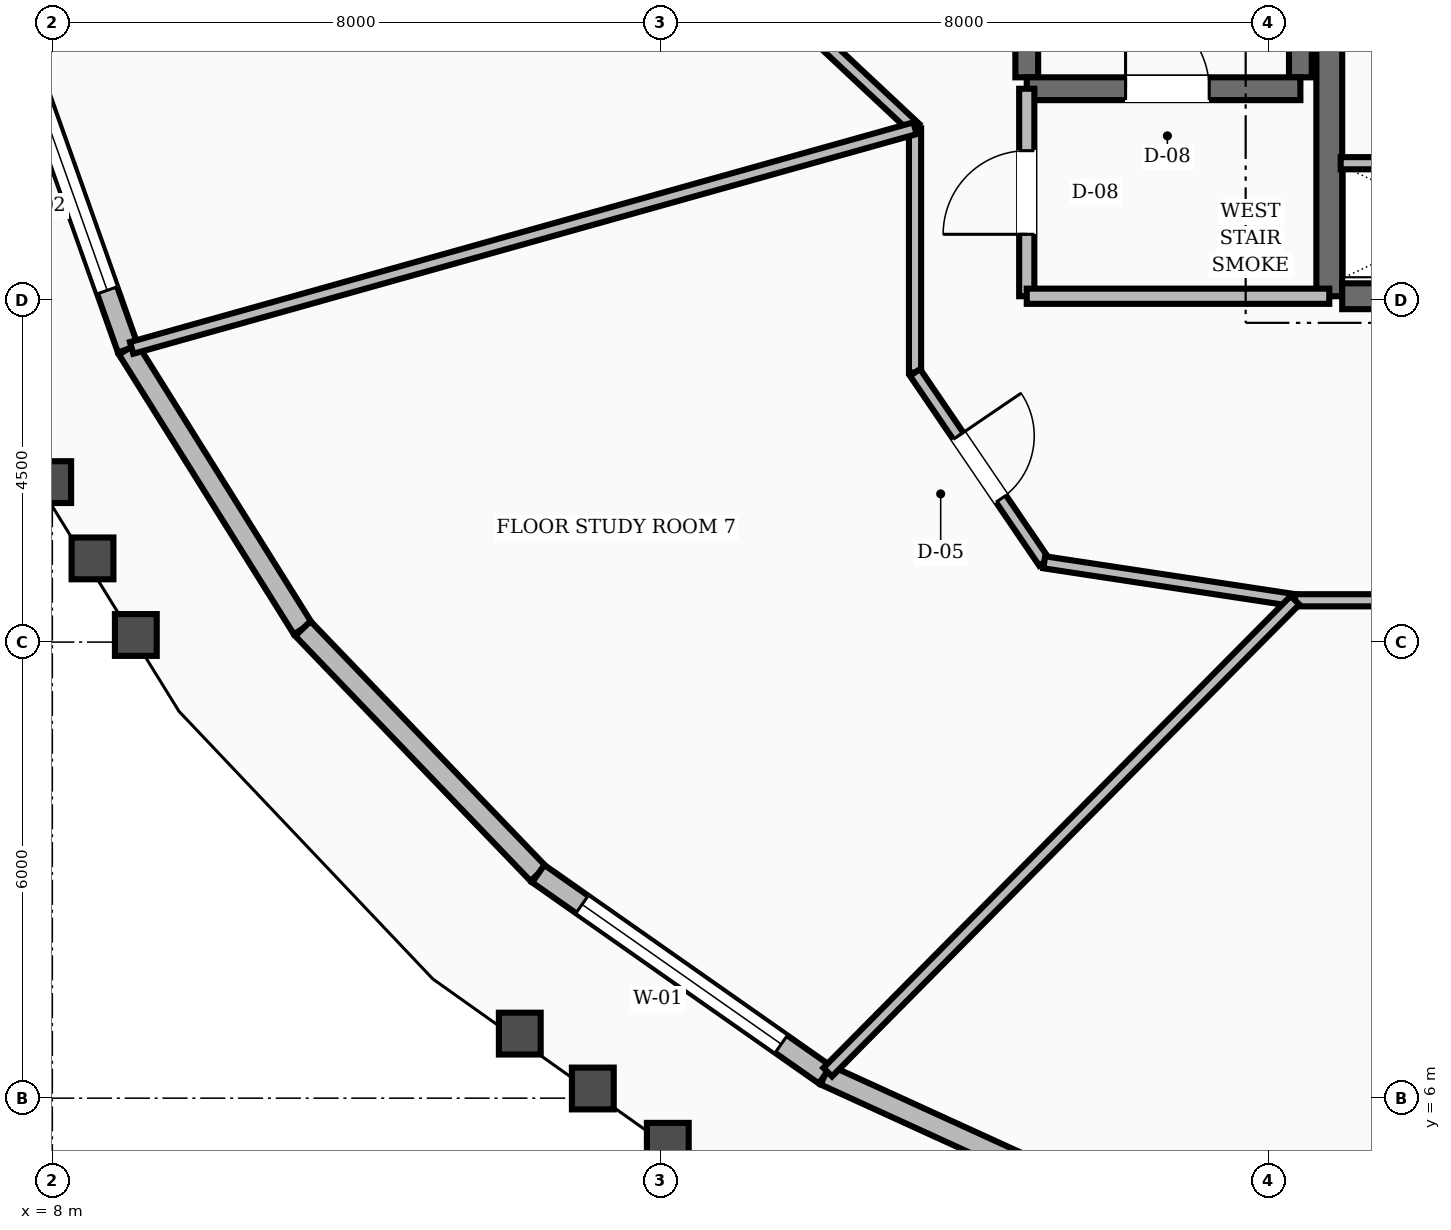
"""IFC4 building model, lengths in metres.
Left out: names, types, materials, properties, quantities, classifications, styles, units other than length and angle.
Written with IfcOpenShell. Run it as: python <this file> out.ifc"""

import sys

from ifc_helpers import new_model, si_unit, direction, frame, frame_2d, origin, place, context, subcontext, project, spatial, rectangle, extrude, element, fill, save


model = new_model("IFC4")
c1 = context("Model", 3, precision=1e-05, world=origin(), true_north=direction((0.0, 1.0)))
c2 = subcontext(c1, "Body", "Model", "MODEL_VIEW")
j1 = project(units=[si_unit("LENGTHUNIT", "METRE"), si_unit("PLANEANGLEUNIT", "RADIAN")], contexts=[c1])
p1 = place(None, origin())
s1 = spatial("IfcSite", under=j1, at=p1, CompositionType="ELEMENT")
p2 = place(p1, origin())
s2 = spatial("IfcBuilding", under=s1, at=p2, CompositionType="ELEMENT")
p3 = place(p2, frame((0.0, 0.0, 192.8)))
s3 = spatial("IfcBuildingStorey", under=s2, at=p3, CompositionType="ELEMENT", Elevation=192.8)
p4 = place(p3, frame((24.8, 16.55, 0.0), z_axis=(0.0, 0.0, 1.0), x_axis=(0.0, 1.0, 0.0)))
e1 = element("IfcWall", 1, at=p4, inside=s3, PredefinedType="SHEAR", context=c2, shape_type="SweptSolid", body=[
    extrude(rectangle(XDim=6.3, YDim=0.34, at=frame_2d((3.15, 0.0))), origin(), (0.0, 0.0, 1.0), 3.6),
])
p5 = place(p3, frame((24.97, 16.55, 0.0), z_axis=(0.0, 0.0, 1.0), x_axis=(1.0, 0.0, 0.0)))
e2 = element("IfcWall", 2, at=p5, inside=s3, PredefinedType="SHEAR", context=c2, shape_type="SweptSolid", body=[
    extrude(rectangle(XDim=3.23, YDim=0.34, at=frame_2d((1.615, 0.0))), origin(), (0.0, 0.0, 1.0), 3.6),
])
for number, where, z_axis, x_axis in (
    (3, (20.82, 19.43, 0.0), (0.0, 0.0, 1.0), (0.0, 1.0, 0.0)),
    (4, (24.42, 19.43, 0.0), (0.0, 0.0, 1.0), (0.0, 1.0, 0.0)),
):
    element("IfcWall", number, at=place(p3, frame(where, z_axis=z_axis, x_axis=x_axis)), inside=s3, PredefinedType="SHEAR", context=c2, shape_type="SweptSolid", body=[
        extrude(rectangle(XDim=8.74, YDim=0.3, at=frame_2d((4.37, 0.0))), origin(), (0.0, 0.0, 1.0), 3.6),
    ])
p6 = place(p3, frame((20.82, 19.28, 0.0), z_axis=(0.0, 0.0, 1.0), x_axis=(1.0, 0.0, 0.0)))
e5 = element("IfcWall", 5, at=p6, inside=s3, PredefinedType="SHEAR", context=c2, shape_type="SweptSolid", body=[
    extrude(rectangle(XDim=3.6, YDim=0.3, at=frame_2d((1.8, 0.0))), origin(), (0.0, 0.0, 1.0), 3.6),
])
p7 = place(p6, frame((1.3, 0.0, 0.0)))
e6 = element("IfcOpeningElement", 6, at=p7, cuts=e5, PredefinedType="OPENING", context=c2, shape_type="SweptSolid", body=[
    extrude(rectangle(XDim=1.1, YDim=2.1, at=frame_2d((0.55, 1.05))), frame((0.0, 0.16, 0.0), z_axis=(0.0, -1.0, 0.0), x_axis=(1.0, 0.0, 0.0)), (0.0, 0.0, 1.0), 0.32),
])
p8 = place(p3, frame((7.578, 19.849, 0.0), z_axis=(0.0, 0.0, 1.0), x_axis=(0.33451387388, -0.942390825604, 0.0)))
e7 = element("IfcWall", 7, at=p8, inside=s3, PredefinedType="STANDARD", context=c2, shape_type="SweptSolid", body=[
    extrude(rectangle(XDim=4.236, YDim=0.28, at=frame_2d((2.118, 0.0))), origin(), (0.0, 0.0, 1.0), 2.82),
])
p9 = place(p8, frame((0.818, 0.0, 0.8)))
e8 = element("IfcOpeningElement", 8, at=p9, cuts=e7, PredefinedType="OPENING", context=c2, shape_type="SweptSolid", body=[
    extrude(rectangle(XDim=2.6, YDim=1.65, at=frame_2d((1.3, 0.825))), frame((0.0, 0.15, 0.0), z_axis=(0.0, -1.0, 0.0), x_axis=(1.0, 0.0, 0.0)), (0.0, 0.0, 1.0), 0.3),
])
p10 = place(p3, frame((8.995, 15.857, 0.0), z_axis=(0.0, 0.0, 1.0), x_axis=(0.530277064752, -0.847824412599, 0.0)))
e9 = element("IfcWall", 9, at=p10, inside=s3, PredefinedType="STANDARD", context=c2, shape_type="SweptSolid", body=[
    extrude(rectangle(XDim=4.339, YDim=0.28, at=frame_2d((2.17, 0.0))), origin(), (0.0, 0.0, 1.0), 2.82),
])
p11 = place(p3, frame((11.296, 12.178, 0.0), z_axis=(0.0, 0.0, 1.0), x_axis=(0.692654585046, -0.721269454375, 0.0)))
e10 = element("IfcWall", 10, at=p11, inside=s3, PredefinedType="STANDARD", context=c2, shape_type="SweptSolid", body=[
    extrude(rectangle(XDim=4.471, YDim=0.28, at=frame_2d((2.235, 0.0))), origin(), (0.0, 0.0, 1.0), 2.82),
])
p12 = place(p3, frame((14.393, 8.953, 0.0), z_axis=(0.0, 0.0, 1.0), x_axis=(0.818721405334, -0.574190961657, 0.0)))
e11 = element("IfcWall", 11, at=p12, inside=s3, PredefinedType="STANDARD", context=c2, shape_type="SweptSolid", body=[
    extrude(rectangle(XDim=4.609, YDim=0.28, at=frame_2d((2.304, 0.0))), origin(), (0.0, 0.0, 1.0), 2.82),
])
p13 = place(p12, frame((0.704, 0.0, 0.8)))
e12 = element("IfcOpeningElement", 12, at=p13, cuts=e11, PredefinedType="OPENING", context=c2, shape_type="SweptSolid", body=[
    extrude(rectangle(XDim=3.2, YDim=1.65, at=frame_2d((1.6, 0.825))), frame((0.0, 0.15, 0.0), z_axis=(0.0, -1.0, 0.0), x_axis=(1.0, 0.0, 0.0)), (0.0, 0.0, 1.0), 0.3),
])
p14 = place(p3, frame((18.166, 6.307, 0.0), z_axis=(0.0, 0.0, 1.0), x_axis=(0.909587572303, -0.415512272155, 0.0)))
e13 = element("IfcWall", 13, at=p14, inside=s3, PredefinedType="STANDARD", context=c2, shape_type="SweptSolid", body=[
    extrude(rectangle(XDim=4.733, YDim=0.28, at=frame_2d((2.366, 0.0))), origin(), (0.0, 0.0, 1.0), 2.82),
])
p15 = place(p3, frame((20.82, 16.55, 0.0), z_axis=(0.0, 0.0, 1.0), x_axis=(0.0, 1.0, 0.0)))
e14 = element("IfcWall", 14, at=p15, inside=s3, PredefinedType="SOLIDWALL", context=c2, shape_type="SweptSolid", body=[
    extrude(rectangle(XDim=2.73, YDim=0.2, at=frame_2d((1.365, 0.0))), origin(), (0.0, 0.0, 1.0), 2.8),
])
p16 = place(p15, frame((0.815, 0.0, 0.0)))
e15 = element("IfcOpeningElement", 15, at=p16, cuts=e14, PredefinedType="OPENING", context=c2, shape_type="SweptSolid", body=[
    extrude(rectangle(XDim=1.1, YDim=2.1, at=frame_2d((0.55, 1.05))), frame((0.0, 0.11, 0.0), z_axis=(0.0, -1.0, 0.0), x_axis=(1.0, 0.0, 0.0)), (0.0, 0.0, 1.0), 0.22),
])
p17 = place(p3, frame((20.82, 16.55, 0.0), z_axis=(0.0, 0.0, 1.0), x_axis=(1.0, 0.0, 0.0)))
e16 = element("IfcWall", 16, at=p17, inside=s3, PredefinedType="SOLIDWALL", context=c2, shape_type="SweptSolid", body=[
    extrude(rectangle(XDim=3.98, YDim=0.2, at=frame_2d((1.99, 0.0))), origin(), (0.0, 0.0, 1.0), 2.8),
])
p18 = place(p3, frame((24.95, 18.3, 0.0), z_axis=(0.0, 0.0, 1.0), x_axis=(1.0, 0.0, 0.0)))
e17 = element("IfcWall", 17, at=p18, inside=s3, PredefinedType="SOLIDWALL", context=c2, shape_type="SweptSolid", body=[
    extrude(rectangle(XDim=3.2, YDim=0.16, at=frame_2d((1.6, 0.0))), origin(), (0.0, 0.0, 1.0), 2.8),
])
p19 = place(p18, frame((0.44, 0.0, 0.0)))
e18 = element("IfcOpeningElement", 18, at=p19, cuts=e17, PredefinedType="OPENING", context=c2, shape_type="SweptSolid", body=[
    extrude(rectangle(XDim=0.86, YDim=2.05, at=frame_2d((0.43, 1.025))), frame((0.0, 0.09, 0.0), z_axis=(0.0, -1.0, 0.0), x_axis=(1.0, 0.0, 0.0)), (0.0, 0.0, 1.0), 0.18),
])
p20 = place(p3, frame((16.95, 21.006, 0.0), z_axis=(0.0, 0.0, 1.0), x_axis=(0.730150682073, -0.683286163674, 0.0)))
e19 = element("IfcWall", 19, at=p20, inside=s3, PredefinedType="SOLIDWALL", context=c2, shape_type="SweptSolid", body=[
    extrude(rectangle(XDim=3.287, YDim=0.16, at=frame_2d((1.644, 0.0))), origin(), (0.0, 0.0, 1.0), 2.8),
])
p21 = place(p3, frame((19.35, 18.76, 0.0), z_axis=(0.0, 0.0, 1.0), x_axis=(0.0, -1.0, 0.0)))
e20 = element("IfcWall", 20, at=p21, inside=s3, PredefinedType="SOLIDWALL", context=c2, shape_type="SweptSolid", body=[
    extrude(rectangle(XDim=3.213, YDim=0.16, at=frame_2d((1.606, 0.0))), origin(), (0.0, 0.0, 1.0), 2.8),
])
p22 = place(p3, frame((19.35, 15.548, 0.0), z_axis=(0.0, 0.0, 1.0), x_axis=(0.562674669208, -0.826678423955, 0.0)))
e21 = element("IfcWall", 21, at=p22, inside=s3, PredefinedType="SOLIDWALL", context=c2, shape_type="SweptSolid", body=[
    extrude(rectangle(XDim=3.021, YDim=0.16, at=frame_2d((1.511, 0.0))), origin(), (0.0, 0.0, 1.0), 2.8),
])
p23 = place(p22, frame((1.01, 0.0, 0.0)))
e22 = element("IfcOpeningElement", 22, at=p23, cuts=e21, PredefinedType="OPENING", context=c2, shape_type="SweptSolid", body=[
    extrude(rectangle(XDim=1.0, YDim=2.1, at=frame_2d((0.5, 1.05))), frame((0.0, 0.09, 0.0), z_axis=(0.0, -1.0, 0.0), x_axis=(1.0, 0.0, 0.0)), (0.0, 0.0, 1.0), 0.18),
])
p24 = place(p3, frame((21.05, 13.05, 0.0), z_axis=(0.0, 0.0, 1.0), x_axis=(0.988710906508, -0.149835721217, 0.0)))
e23 = element("IfcWall", 23, at=p24, inside=s3, PredefinedType="SOLIDWALL", context=c2, shape_type="SweptSolid", body=[
    extrude(rectangle(XDim=3.337, YDim=0.16, at=frame_2d((1.668, 0.0))), origin(), (0.0, 0.0, 1.0), 2.8),
])
p25 = place(p3, frame((24.349, 12.55, 0.0), z_axis=(0.0, 0.0, 1.0), x_axis=(1.0, 0.0, 0.0)))
e24 = element("IfcWall", 24, at=p25, inside=s3, PredefinedType="SOLIDWALL", context=c2, shape_type="SweptSolid", body=[
    extrude(rectangle(XDim=2.908, YDim=0.16, at=frame_2d((1.454, 0.0))), origin(), (0.0, 0.0, 1.0), 2.8),
])
p26 = place(p3, frame((19.35, 18.76, 0.0), z_axis=(0.0, 0.0, 1.0), x_axis=(-0.962860195961, -0.270000450061, 0.0)))
e25 = element("IfcWall", 25, at=p26, inside=s3, PredefinedType="SOLIDWALL", context=c2, shape_type="SweptSolid", body=[
    extrude(rectangle(XDim=10.704, YDim=0.16, at=frame_2d((5.352, 0.0))), origin(), (0.0, 0.0, 1.0), 2.8),
])
p27 = place(p3, frame((24.349, 12.55, 0.0), z_axis=(0.0, 0.0, 1.0), x_axis=(-0.703675406186, -0.710521584985, 0.0)))
e26 = element("IfcWall", 26, at=p27, inside=s3, PredefinedType="SOLIDWALL", context=c2, shape_type="SweptSolid", body=[
    extrude(rectangle(XDim=8.737, YDim=0.16, at=frame_2d((4.368, 0.0))), origin(), (0.0, 0.0, 1.0), 2.8),
])
p28 = place(p9, origin())
e27 = element("IfcWindow", 27, at=p28, inside=s3, PartitioningType="SINGLE_PANEL", PredefinedType="WINDOW", context=c2, shape_type="SweptSolid", body=[
    extrude(rectangle(XDim=2.6, YDim=1.65, at=frame_2d((1.3, 0.825))), frame((0.0, 0.03, 0.0), z_axis=(0.0, -1.0, 0.0), x_axis=(1.0, 0.0, 0.0)), (0.0, 0.0, 1.0), 0.06),
])
fill(e8, e27)
p29 = place(p13, origin())
e28 = element("IfcWindow", 28, at=p29, inside=s3, PartitioningType="SINGLE_PANEL", PredefinedType="WINDOW", context=c2, shape_type="SweptSolid", body=[
    extrude(rectangle(XDim=3.2, YDim=1.65, at=frame_2d((1.6, 0.825))), frame((0.0, 0.03, 0.0), z_axis=(0.0, -1.0, 0.0), x_axis=(1.0, 0.0, 0.0)), (0.0, 0.0, 1.0), 0.06),
])
fill(e12, e28)
p30 = place(p7, origin())
e29 = element("IfcDoor", 29, at=p30, inside=s3, OperationType="SINGLE_SWING_LEFT", PredefinedType="DOOR", context=c2, shape_type="SweptSolid", body=[
    extrude(rectangle(XDim=1.1, YDim=2.1, at=frame_2d((0.55, 1.05))), frame((0.0, 0.025, 0.0), z_axis=(0.0, -1.0, 0.0), x_axis=(1.0, 0.0, 0.0)), (0.0, 0.0, 1.0), 0.05),
])
fill(e6, e29)
p31 = place(p16, origin())
e30 = element("IfcDoor", 30, at=p31, inside=s3, OperationType="SINGLE_SWING_LEFT", PredefinedType="DOOR", context=c2, shape_type="SweptSolid", body=[
    extrude(rectangle(XDim=1.1, YDim=2.1, at=frame_2d((0.55, 1.05))), frame((0.0, 0.025, 0.0), z_axis=(0.0, -1.0, 0.0), x_axis=(1.0, 0.0, 0.0)), (0.0, 0.0, 1.0), 0.05),
])
fill(e15, e30)
p32 = place(p23, origin())
e31 = element("IfcDoor", 31, at=p32, inside=s3, OperationType="SINGLE_SWING_LEFT", PredefinedType="DOOR", context=c2, shape_type="SweptSolid", body=[
    extrude(rectangle(XDim=1.0, YDim=2.1, at=frame_2d((0.5, 1.05))), frame((0.0, 0.025, 0.0), z_axis=(0.0, -1.0, 0.0), x_axis=(1.0, 0.0, 0.0)), (0.0, 0.0, 1.0), 0.05),
])
fill(e22, e31)
save(model, sys.argv[1])
